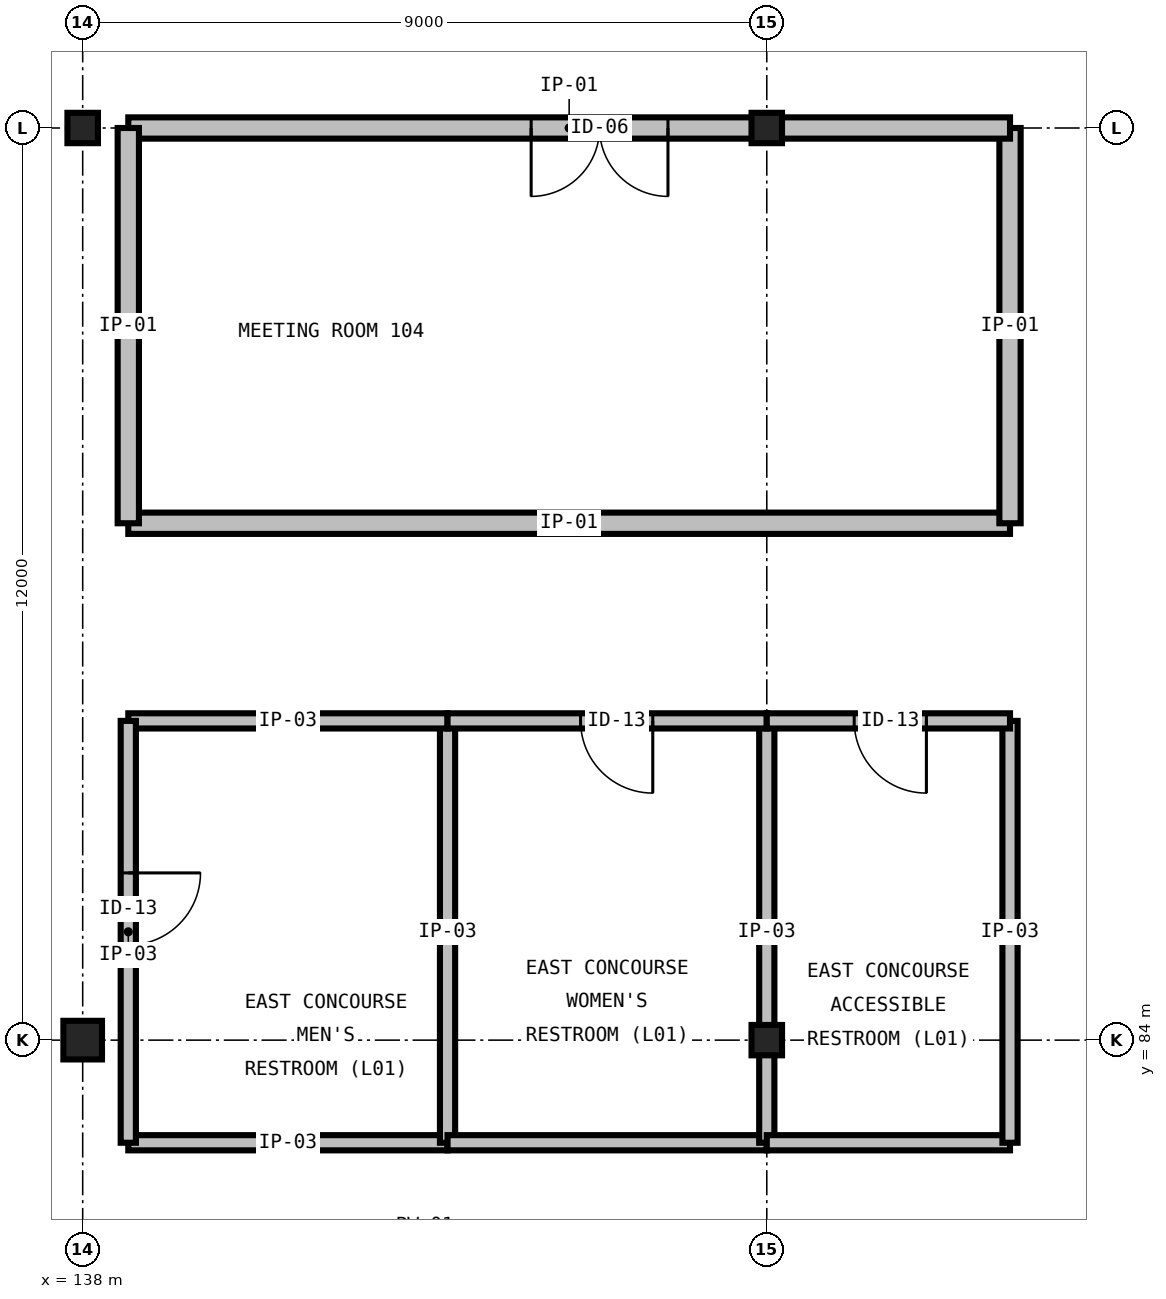
"""IFC4 building model, lengths in metres.
Left out: names, types, materials, properties, quantities, classifications, styles, units other than length and angle.
Written with IfcOpenShell. Run it as: python <this file> out.ifc"""

import sys

from ifc_helpers import new_model, si_unit, direction, frame, frame_2d, origin, origin_2d, place, context, subcontext, project, spatial, rectangle, hollow_rectangle, i_section, extrude, element, fill, save


model = new_model("IFC4")
c1 = context("Model", 3, precision=1e-05, world=origin(), true_north=direction((0.0, 1.0)))
c2 = subcontext(c1, "Body", "Model", "MODEL_VIEW")
j1 = project(units=[si_unit("LENGTHUNIT", "METRE"), si_unit("PLANEANGLEUNIT", "RADIAN")], contexts=[c1])
p1 = place(None, origin())
s1 = spatial("IfcSite", under=j1, at=p1, CompositionType="ELEMENT")
p2 = place(p1, origin())
s2 = spatial("IfcBuilding", under=s1, at=p2, CompositionType="ELEMENT")
p3 = place(p2, frame((0.0, 0.0, 6.0)))
s3 = spatial("IfcBuildingStorey", under=s2, at=p3, CompositionType="ELEMENT", Elevation=6.0)
p4 = place(p3, frame((138.0, 84.0, 0.0), z_axis=(0.0, 0.0, 1.0), x_axis=(1.0, 0.0, 0.0)))
e1 = element("IfcColumn", 1, at=p4, inside=s3, PredefinedType="COLUMN", context=c2, shape_type="SweptSolid", body=[
    extrude(hollow_rectangle(XDim=0.508, YDim=0.508, WallThickness=0.015, at=origin_2d()), origin(), (0.0, 0.0, 1.0), 6.0),
])
for number, where, z_axis, x_axis in (
    (2, (138.0, 96.0, 0.0), (0.0, 0.0, 1.0), (1.0, 0.0, 0.0)),
    (3, (147.0, 84.0, 0.0), (0.0, 0.0, 1.0), (1.0, 0.0, 0.0)),
    (4, (147.0, 96.0, 0.0), (0.0, 0.0, 1.0), (1.0, 0.0, 0.0)),
):
    element("IfcColumn", number, at=place(p3, frame(where, z_axis=z_axis, x_axis=x_axis)), inside=s3, PredefinedType="COLUMN", context=c2, shape_type="SweptSolid", body=[
        extrude(i_section(OverallWidth=0.401, OverallDepth=0.399, WebThickness=0.025, FlangeThickness=0.04, FilletRadius=0.031, at=origin_2d()), origin(), (0.0, 0.0, 1.0), 6.0),
    ])
p5 = place(p3, frame((138.6, 82.65, 0.0), z_axis=(0.0, 0.0, 1.0), x_axis=(1.0, 0.0, 0.0)))
e5 = element("IfcWall", 5, at=p5, inside=s3, PredefinedType="PARTITIONING", context=c2, shape_type="SweptSolid", body=[
    extrude(rectangle(XDim=4.2, YDim=0.2, at=frame_2d((2.1, 0.0))), origin(), (0.0, 0.0, 1.0), 5.68),
])
p6 = place(p3, frame((142.8, 82.65, 0.0), z_axis=(0.0, 0.0, 1.0), x_axis=(0.0, 1.0, 0.0)))
e6 = element("IfcWall", 6, at=p6, inside=s3, PredefinedType="PARTITIONING", context=c2, shape_type="SweptSolid", body=[
    extrude(rectangle(XDim=5.55, YDim=0.2, at=frame_2d((2.775, 0.0))), origin(), (0.0, 0.0, 1.0), 5.68),
])
p7 = place(p3, frame((142.8, 88.2, 0.0), z_axis=(0.0, 0.0, 1.0), x_axis=(-1.0, 0.0, 0.0)))
e7 = element("IfcWall", 7, at=p7, inside=s3, PredefinedType="PARTITIONING", context=c2, shape_type="SweptSolid", body=[
    extrude(rectangle(XDim=4.2, YDim=0.2, at=frame_2d((2.1, 0.0))), origin(), (0.0, 0.0, 1.0), 5.68),
])
p8 = place(p3, frame((138.6, 88.2, 0.0), z_axis=(0.0, 0.0, 1.0), x_axis=(0.0, -1.0, 0.0)))
e8 = element("IfcWall", 8, at=p8, inside=s3, PredefinedType="PARTITIONING", context=c2, shape_type="SweptSolid", body=[
    extrude(rectangle(XDim=5.55, YDim=0.2, at=frame_2d((2.775, 0.0))), origin(), (0.0, 0.0, 1.0), 5.68),
])
p9 = place(p8, frame((2.0, 0.0, 0.0)))
e9 = element("IfcOpeningElement", 9, at=p9, cuts=e8, PredefinedType="OPENING", context=c2, shape_type="SweptSolid", body=[
    extrude(rectangle(XDim=0.95, YDim=2.15, at=frame_2d((0.475, 1.075))), frame((0.0, 0.115, 0.0), z_axis=(0.0, -1.0, 0.0), x_axis=(1.0, 0.0, 0.0)), (0.0, 0.0, 1.0), 0.23),
])
p10 = place(p3, frame((142.8, 82.65, 0.0), z_axis=(0.0, 0.0, 1.0), x_axis=(1.0, 0.0, 0.0)))
e10 = element("IfcWall", 10, at=p10, inside=s3, PredefinedType="PARTITIONING", context=c2, shape_type="SweptSolid", body=[
    extrude(rectangle(XDim=4.2, YDim=0.2, at=frame_2d((2.1, 0.0))), origin(), (0.0, 0.0, 1.0), 5.68),
])
p11 = place(p3, frame((147.0, 82.65, 0.0), z_axis=(0.0, 0.0, 1.0), x_axis=(0.0, 1.0, 0.0)))
e11 = element("IfcWall", 11, at=p11, inside=s3, PredefinedType="PARTITIONING", context=c2, shape_type="SweptSolid", body=[
    extrude(rectangle(XDim=5.55, YDim=0.2, at=frame_2d((2.775, 0.0))), origin(), (0.0, 0.0, 1.0), 4.83),
])
p12 = place(p3, frame((147.0, 88.2, 0.0), z_axis=(0.0, 0.0, 1.0), x_axis=(-1.0, 0.0, 0.0)))
e12 = element("IfcWall", 12, at=p12, inside=s3, PredefinedType="PARTITIONING", context=c2, shape_type="SweptSolid", body=[
    extrude(rectangle(XDim=4.2, YDim=0.2, at=frame_2d((2.1, 0.0))), origin(), (0.0, 0.0, 1.0), 5.68),
])
p13 = place(p12, frame((1.5, 0.0, 0.0)))
e13 = element("IfcOpeningElement", 13, at=p13, cuts=e12, PredefinedType="OPENING", context=c2, shape_type="SweptSolid", body=[
    extrude(rectangle(XDim=0.95, YDim=2.15, at=frame_2d((0.475, 1.075))), frame((0.0, 0.115, 0.0), z_axis=(0.0, -1.0, 0.0), x_axis=(1.0, 0.0, 0.0)), (0.0, 0.0, 1.0), 0.23),
])
p14 = place(p3, frame((147.0, 82.65, 0.0), z_axis=(0.0, 0.0, 1.0), x_axis=(1.0, 0.0, 0.0)))
e14 = element("IfcWall", 14, at=p14, inside=s3, PredefinedType="PARTITIONING", context=c2, shape_type="SweptSolid", body=[
    extrude(rectangle(XDim=3.2, YDim=0.2, at=frame_2d((1.6, 0.0))), origin(), (0.0, 0.0, 1.0), 5.68),
])
p15 = place(p3, frame((150.2, 82.65, 0.0), z_axis=(0.0, 0.0, 1.0), x_axis=(0.0, 1.0, 0.0)))
e15 = element("IfcWall", 15, at=p15, inside=s3, PredefinedType="PARTITIONING", context=c2, shape_type="SweptSolid", body=[
    extrude(rectangle(XDim=5.55, YDim=0.2, at=frame_2d((2.775, 0.0))), origin(), (0.0, 0.0, 1.0), 5.68),
])
p16 = place(p3, frame((150.2, 88.2, 0.0), z_axis=(0.0, 0.0, 1.0), x_axis=(-1.0, 0.0, 0.0)))
e16 = element("IfcWall", 16, at=p16, inside=s3, PredefinedType="PARTITIONING", context=c2, shape_type="SweptSolid", body=[
    extrude(rectangle(XDim=3.2, YDim=0.2, at=frame_2d((1.6, 0.0))), origin(), (0.0, 0.0, 1.0), 5.68),
])
p17 = place(p16, frame((1.1, 0.0, 0.0)))
e17 = element("IfcOpeningElement", 17, at=p17, cuts=e16, PredefinedType="OPENING", context=c2, shape_type="SweptSolid", body=[
    extrude(rectangle(XDim=0.95, YDim=2.15, at=frame_2d((0.475, 1.075))), frame((0.0, 0.115, 0.0), z_axis=(0.0, -1.0, 0.0), x_axis=(1.0, 0.0, 0.0)), (0.0, 0.0, 1.0), 0.23),
])
p18 = place(p3, frame((138.6, 90.8, 0.0), z_axis=(0.0, 0.0, 1.0), x_axis=(1.0, 0.0, 0.0)))
e18 = element("IfcWall", 18, at=p18, inside=s3, PredefinedType="PARTITIONING", context=c2, shape_type="SweptSolid", body=[
    extrude(rectangle(XDim=11.6, YDim=0.28, at=frame_2d((5.8, 0.0))), origin(), (0.0, 0.0, 1.0), 5.68),
])
p19 = place(p3, frame((150.2, 90.8, 0.0), z_axis=(0.0, 0.0, 1.0), x_axis=(0.0, 1.0, 0.0)))
e19 = element("IfcWall", 19, at=p19, inside=s3, PredefinedType="PARTITIONING", context=c2, shape_type="SweptSolid", body=[
    extrude(rectangle(XDim=5.2, YDim=0.28, at=frame_2d((2.6, 0.0))), origin(), (0.0, 0.0, 1.0), 5.68),
])
p20 = place(p3, frame((150.2, 96.0, 0.0), z_axis=(0.0, 0.0, 1.0), x_axis=(-1.0, 0.0, 0.0)))
e20 = element("IfcWall", 20, at=p20, inside=s3, PredefinedType="PARTITIONING", context=c2, shape_type="SweptSolid", body=[
    extrude(rectangle(XDim=11.6, YDim=0.28, at=frame_2d((5.8, 0.0))), origin(), (0.0, 0.0, 1.0), 4.987),
])
p21 = place(p20, frame((4.5, 0.0, 0.0)))
e21 = element("IfcOpeningElement", 21, at=p21, cuts=e20, PredefinedType="OPENING", context=c2, shape_type="SweptSolid", body=[
    extrude(rectangle(XDim=1.8, YDim=2.3, at=frame_2d((0.9, 1.15))), frame((0.0, 0.155, 0.0), z_axis=(0.0, -1.0, 0.0), x_axis=(1.0, 0.0, 0.0)), (0.0, 0.0, 1.0), 0.31),
])
p22 = place(p3, frame((138.6, 96.0, 0.0), z_axis=(0.0, 0.0, 1.0), x_axis=(0.0, -1.0, 0.0)))
e22 = element("IfcWall", 22, at=p22, inside=s3, PredefinedType="PARTITIONING", context=c2, shape_type="SweptSolid", body=[
    extrude(rectangle(XDim=5.2, YDim=0.28, at=frame_2d((2.6, 0.0))), origin(), (0.0, 0.0, 1.0), 5.68),
])
p23 = place(p9, origin())
e23 = element("IfcDoor", 23, at=p23, inside=s3, OperationType="SINGLE_SWING_LEFT", PredefinedType="DOOR", context=c2, shape_type="SweptSolid", body=[
    extrude(rectangle(XDim=0.95, YDim=2.15, at=frame_2d((0.475, 1.075))), frame((0.0, 0.025, 0.0), z_axis=(0.0, -1.0, 0.0), x_axis=(1.0, 0.0, 0.0)), (0.0, 0.0, 1.0), 0.05),
])
fill(e9, e23)
p24 = place(p13, origin())
e24 = element("IfcDoor", 24, at=p24, inside=s3, OperationType="SINGLE_SWING_LEFT", PredefinedType="DOOR", context=c2, shape_type="SweptSolid", body=[
    extrude(rectangle(XDim=0.95, YDim=2.15, at=frame_2d((0.475, 1.075))), frame((0.0, 0.025, 0.0), z_axis=(0.0, -1.0, 0.0), x_axis=(1.0, 0.0, 0.0)), (0.0, 0.0, 1.0), 0.05),
])
fill(e13, e24)
p25 = place(p17, origin())
e25 = element("IfcDoor", 25, at=p25, inside=s3, OperationType="SINGLE_SWING_LEFT", PredefinedType="DOOR", context=c2, shape_type="SweptSolid", body=[
    extrude(rectangle(XDim=0.95, YDim=2.15, at=frame_2d((0.475, 1.075))), frame((0.0, 0.025, 0.0), z_axis=(0.0, -1.0, 0.0), x_axis=(1.0, 0.0, 0.0)), (0.0, 0.0, 1.0), 0.05),
])
fill(e17, e25)
p26 = place(p21, origin())
e26 = element("IfcDoor", 26, at=p26, inside=s3, OperationType="DOUBLE_DOOR_SINGLE_SWING", PredefinedType="DOOR", context=c2, shape_type="SweptSolid", body=[
    extrude(rectangle(XDim=1.8, YDim=2.3, at=frame_2d((0.9, 1.15))), frame((0.0, 0.025, 0.0), z_axis=(0.0, -1.0, 0.0), x_axis=(1.0, 0.0, 0.0)), (0.0, 0.0, 1.0), 0.05),
])
fill(e21, e26)
save(model, sys.argv[1])
